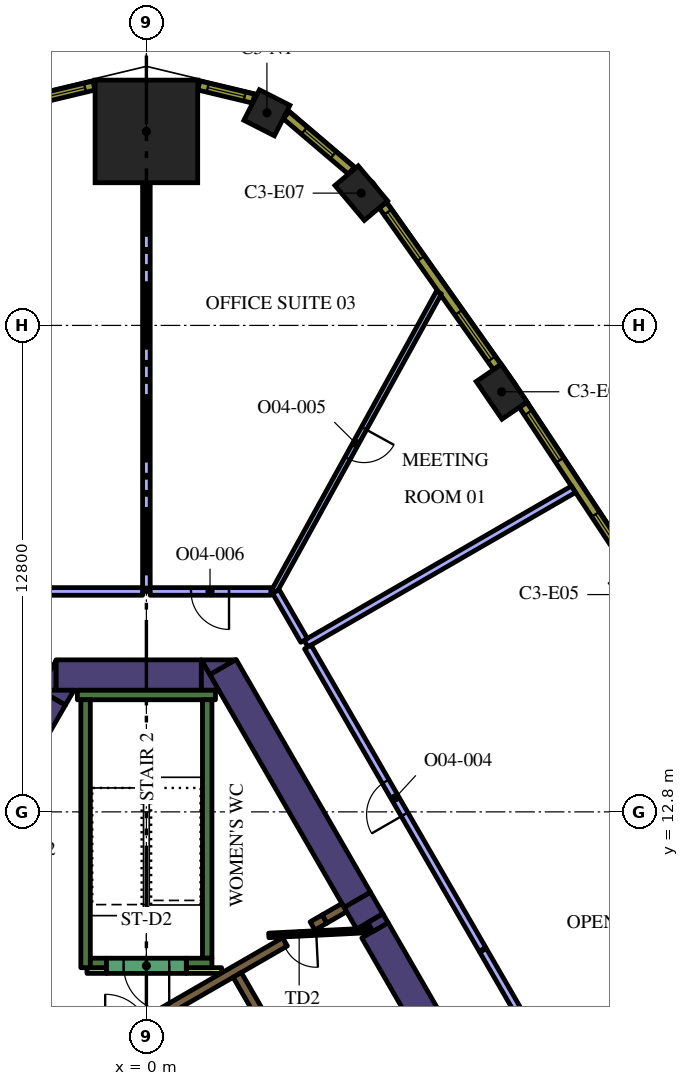
"""IFC4 building model, lengths in metres.
Left out: names, types, materials, properties, quantities, classifications, styles, units other than length and angle.
Written with IfcOpenShell. Run it as: python <this file> out.ifc"""

import sys

from ifc_helpers import new_model, si_unit, direction, frame, frame_2d, origin, origin_2d, place, context, subcontext, project, spatial, polyline, rectangle, outline, extrude, element, fill, save


model = new_model("IFC4")
c1 = context("Model", 3, precision=1e-05, world=origin(), true_north=direction((0.0, 1.0)))
c2 = subcontext(c1, "Body", "Model", "MODEL_VIEW")
j1 = project(units=[si_unit("LENGTHUNIT", "METRE"), si_unit("PLANEANGLEUNIT", "RADIAN")], contexts=[c1])
p1 = place(None, origin())
s1 = spatial("IfcSite", under=j1, at=p1, CompositionType="ELEMENT")
p2 = place(p1, origin())
s2 = spatial("IfcBuilding", under=s1, at=p2, CompositionType="ELEMENT")
p3 = place(p2, frame((0.0, 0.0, 179.4)))
s3 = spatial("IfcBuildingStorey", under=s2, at=p3, CompositionType="ELEMENT", Elevation=179.4)
p4 = place(p3, frame((0.0, 30.704, 0.0), z_axis=(0.0, 0.0, 1.0), x_axis=(0.0, 1.0, 0.0)))
e1 = element("IfcColumn", 1, at=p4, inside=s3, PredefinedType="COLUMN", context=c2, shape_type="SweptSolid", body=[
    extrude(rectangle(XDim=2.7, YDim=2.7, at=origin_2d()), origin(), (0.0, 0.0, 1.0), 4.2),
])
for number, where, z_axis, x_axis in (
    (2, (9.348, 23.854, 0.0), (0.0, 0.0, 1.0), (-0.565, 0.825, 0.0)),
    (3, (5.654, 29.081, 0.0), (0.0, 0.0, 1.0), (-0.644, 0.765, 0.0)),
):
    element("IfcColumn", number, at=place(p3, frame(where, z_axis=z_axis, x_axis=x_axis)), inside=s3, PredefinedType="COLUMN", context=c2, shape_type="SweptSolid", body=[
        extrude(rectangle(XDim=1.2, YDim=0.8, at=origin_2d()), origin(), (0.0, 0.0, 1.0), 4.2),
    ])
p5 = place(p3, frame((3.171, 31.195, 0.0), z_axis=(0.0, 0.0, 1.0), x_axis=(-0.891486197647, 0.453047855535, 0.0)))
e4 = element("IfcColumn", 4, at=p5, inside=s3, PredefinedType="COLUMN", context=c2, shape_type="SweptSolid", body=[
    extrude(rectangle(XDim=0.9, YDim=0.9, at=origin_2d()), origin(), (0.0, 0.0, 1.0), 4.2),
])
p6 = place(p3, frame((5.878, 9.918, 0.0), z_axis=(0.0, 0.0, 1.0), x_axis=(-0.499893918903, 0.866086641072, 0.0)))
e5 = element("IfcWall", 5, at=p6, inside=s3, PredefinedType="SOLIDWALL", context=c2, shape_type="SweptSolid", body=[
    extrude(rectangle(XDim=0.657, YDim=0.8, at=frame_2d((0.329, 0.0))), origin(), (0.0, 0.0, 1.0), 4.2),
])
p7 = place(p3, frame((8.279, 5.761, 0.0), z_axis=(0.0, 0.0, 1.0), x_axis=(-0.500024261398, 0.866011396007, 0.0)))
e6 = element("IfcWall", 6, at=p7, inside=s3, PredefinedType="SOLIDWALL", context=c2, shape_type="SweptSolid", body=[
    extrude(rectangle(XDim=4.528, YDim=0.8, at=frame_2d((2.264, 0.0))), origin(), (0.0, 0.0, 1.0), 4.2),
])
p8 = place(p3, origin())
e7 = element("IfcWall", 7, at=p8, inside=s3, PredefinedType="SOLIDWALL", context=c2, shape_type="SweptSolid", body=[
    extrude(outline(polyline([(5.961, 9.654), (5.827, 9.886), (6.226, 10.116), (6.36, 9.884), (5.961, 9.654)])), origin(), (0.0, 0.0, 1.0), 4.2),
])
p9 = place(p3, frame((5.549, 10.489, 0.0), z_axis=(0.0, 0.0, 1.0), x_axis=(-0.50001746176, 0.866015321998, 0.0)))
e8 = element("IfcWall", 8, at=p9, inside=s3, PredefinedType="SOLIDWALL", context=c2, shape_type="SweptSolid", body=[
    extrude(rectangle(XDim=7.068, YDim=0.8, at=frame_2d((3.534, 0.0))), origin(), (0.0, 0.0, 1.0), 4.2),
])
e9 = element("IfcWall", 9, at=p8, inside=s3, PredefinedType="SOLIDWALL", context=c2, shape_type="SweptSolid", body=[
    extrude(outline(polyline([(1.443, 16.8), (2.339, 16.8), (1.667, 16.412), (1.443, 16.8)])), origin(), (0.0, 0.0, 1.0), 4.2),
])
p10 = place(p3, frame((-2.379, 16.4, 0.0), z_axis=(0.0, 0.0, 1.0), x_axis=(1.0, 0.0, 0.0)))
e10 = element("IfcWall", 10, at=p10, inside=s3, PredefinedType="SOLIDWALL", context=c2, shape_type="SweptSolid", body=[
    extrude(rectangle(XDim=3.824, YDim=0.8, at=frame_2d((1.912, 0.0))), origin(), (0.0, 0.0, 1.0), 4.2),
])
e11 = element("IfcWall", 11, at=p8, inside=s3, PredefinedType="SOLIDWALL", context=c2, shape_type="SweptSolid", body=[
    extrude(outline(polyline([(1.905, 16.0), (1.447, 16.0), (1.447, 16.793), (1.905, 16.0)])), origin(), (0.0, 0.0, 1.0), 4.2),
])
e12 = element("IfcWall", 12, at=p8, inside=s3, PredefinedType="SOLIDWALL", context=c2, shape_type="SweptSolid", body=[
    extrude(outline(polyline([(-2.829, 16.0), (-2.381, 16.776), (-2.381, 16.0), (-2.829, 16.0)])), origin(), (0.0, 0.0, 1.0), 4.2),
])
p11 = place(p3, frame((-2.477, 15.81, 0.0), z_axis=(0.0, 0.0, 1.0), x_axis=(-0.499969377405, -0.866043083026, 0.0)))
e13 = element("IfcWall", 13, at=p11, inside=s3, PredefinedType="SOLIDWALL", context=c2, shape_type="SweptSolid", body=[
    extrude(rectangle(XDim=2.824, YDim=0.8, at=frame_2d((1.412, 0.0))), origin(), (0.0, 0.0, 1.0), 4.2),
])
e14 = element("IfcWall", 14, at=p8, inside=s3, PredefinedType="SOLIDWALL", context=c2, shape_type="SweptSolid", body=[
    extrude(outline(polyline([(-1.905, 16.0), (-2.129, 15.612), (-2.801, 16.0), (-1.905, 16.0)])), origin(), (0.0, 0.0, 1.0), 4.2),
])
p12 = place(p3, frame((-1.817, 15.875, 0.0), z_axis=(0.0, 0.0, 1.0), x_axis=(1.0, 0.0, 0.0)))
e15 = element("IfcWall", 15, at=p12, inside=s3, PredefinedType="SOLIDWALL", context=c2, shape_type="SweptSolid", body=[
    extrude(rectangle(XDim=3.634, YDim=0.25, at=frame_2d((1.817, 0.0))), origin(), (0.0, 0.0, 1.0), 4.2),
])
p13 = place(p3, frame((1.6, 8.95, 0.0), z_axis=(0.0, 0.0, 1.0), x_axis=(0.0, 1.0, 0.0)))
e16 = element("IfcWall", 16, at=p13, inside=s3, PredefinedType="SOLIDWALL", context=c2, shape_type="SweptSolid", body=[
    extrude(rectangle(XDim=6.8, YDim=0.25, at=frame_2d((3.4, 0.0))), origin(), (0.0, 0.0, 1.0), 4.2),
])
p14 = place(p3, frame((1.05, 8.825, 0.0), z_axis=(0.0, 0.0, 1.0), x_axis=(1.0, 0.0, 0.0)))
e17 = element("IfcWall", 17, at=p14, inside=s3, PredefinedType="SOLIDWALL", context=c2, shape_type="SweptSolid", body=[
    extrude(rectangle(XDim=0.675, YDim=0.25, at=frame_2d((0.337, 0.0))), origin(), (0.0, 0.0, 1.0), 4.2),
])
p15 = place(p3, frame((-1.6, 8.7, 0.0), z_axis=(0.0, 0.0, 1.0), x_axis=(0.0, 1.0, 0.0)))
e18 = element("IfcWall", 18, at=p15, inside=s3, PredefinedType="SOLIDWALL", context=c2, shape_type="SweptSolid", body=[
    extrude(rectangle(XDim=7.05, YDim=0.25, at=frame_2d((3.525, 0.0))), origin(), (0.0, 0.0, 1.0), 4.2),
])
p16 = place(p3, frame((-1.475, 8.825, 0.0), z_axis=(0.0, 0.0, 1.0), x_axis=(1.0, 0.0, 0.0)))
e19 = element("IfcWall", 19, at=p16, inside=s3, PredefinedType="SOLIDWALL", context=c2, shape_type="SweptSolid", body=[
    extrude(rectangle(XDim=0.425, YDim=0.25, at=frame_2d((0.212, 0.0))), origin(), (0.0, 0.0, 1.0), 4.2),
])
p17 = place(p3, frame((3.647, 9.38, 0.0), z_axis=(0.0, 0.0, 1.0), x_axis=(-0.866025015791, -0.500000672024, 0.0)))
e20 = element("IfcWall", 20, at=p17, inside=s3, PredefinedType="SOLIDWALL", context=c2, shape_type="SweptSolid", body=[
    extrude(rectangle(XDim=3.849, YDim=0.25, at=frame_2d((1.924, 0.0))), origin(), (0.0, 0.0, 1.0), 4.2),
])
p18 = place(p3, frame((4.688, 9.981, 0.0), z_axis=(0.0, 0.0, 1.0), x_axis=(-0.865974312977, -0.500088481434, 0.0)))
e21 = element("IfcWall", 21, at=p18, inside=s3, PredefinedType="SOLIDWALL", context=c2, shape_type="SweptSolid", body=[
    extrude(rectangle(XDim=0.366, YDim=0.25, at=frame_2d((0.183, 0.0))), origin(), (0.0, 0.0, 1.0), 4.2),
])
p19 = place(p3, frame((4.689, 9.982, 0.0), z_axis=(0.0, 0.0, 1.0), x_axis=(0.865947592822, 0.500134748329, 0.0)))
e22 = element("IfcWall", 22, at=p19, inside=s3, PredefinedType="SOLIDWALL", context=c2, shape_type="SweptSolid", body=[
    extrude(rectangle(XDim=0.598, YDim=0.25, at=frame_2d((0.299, 0.0))), origin(), (0.0, 0.0, 1.0), 4.2),
])
p20 = place(p3, frame((1.05, 8.625, 0.0), z_axis=(0.0, 0.0, 1.0), x_axis=(1.0, 0.0, 0.0)))
e23 = element("IfcWall", 23, at=p20, inside=s3, PredefinedType="PARTITIONING", context=c2, shape_type="SweptSolid", body=[
    extrude(rectangle(XDim=0.929, YDim=0.15, at=frame_2d((0.464, 0.0))), origin(), (0.0, 0.0, 1.0), 3.15),
])
p21 = place(p3, frame((-1.564, 8.625, 0.0), z_axis=(0.0, 0.0, 1.0), x_axis=(1.0, 0.0, 0.0)))
e24 = element("IfcWall", 24, at=p21, inside=s3, PredefinedType="PARTITIONING", context=c2, shape_type="SweptSolid", body=[
    extrude(rectangle(XDim=0.514, YDim=0.15, at=frame_2d((0.257, 0.0))), origin(), (0.0, 0.0, 1.0), 3.15),
])
p22 = place(p3, frame((8.565, -2.185, 0.0), z_axis=(0.0, 0.0, 1.0), x_axis=(-0.499997954832, 0.866026584559, 0.0)))
e25 = element("IfcWall", 25, at=p22, inside=s3, PredefinedType="SOLIDWALL", context=c2, shape_type="SweptSolid", body=[
    extrude(rectangle(XDim=12.35, YDim=0.25, at=frame_2d((6.175, 0.0))), origin(), (0.0, 0.0, 1.0), 4.2),
])
p23 = place(p22, frame((0.585, 0.0, 0.0)))
e26 = element("IfcOpeningElement", 26, at=p23, cuts=e25, PredefinedType="OPENING", context=c2, shape_type="SweptSolid", body=[
    extrude(rectangle(XDim=1.1, YDim=2.1, at=frame_2d((0.55, 1.05))), frame((0.0, 0.135, 0.0), z_axis=(0.0, -1.0, 0.0), x_axis=(1.0, 0.0, 0.0)), (0.0, 0.0, 1.0), 0.27),
])
p24 = place(p3, frame((1.05, 8.75, 0.0), z_axis=(0.0, 0.0, 1.0), x_axis=(-1.0, 0.0, 0.0)))
e27 = element("IfcWall", 27, at=p24, inside=s3, PredefinedType="SOLIDWALL", context=c2, shape_type="SweptSolid", body=[
    extrude(rectangle(XDim=2.1, YDim=0.4, at=frame_2d((1.05, 0.0))), origin(), (0.0, 0.0, 1.0), 4.2),
])
p25 = place(p24, frame((0.45, 0.0, 0.0)))
e28 = element("IfcOpeningElement", 28, at=p25, cuts=e27, PredefinedType="OPENING", context=c2, shape_type="SweptSolid", body=[
    extrude(rectangle(XDim=1.2, YDim=2.1, at=frame_2d((0.6, 1.05))), frame((0.0, 0.21, 0.0), z_axis=(0.0, -1.0, 0.0), x_axis=(1.0, 0.0, 0.0)), (0.0, 0.0, 1.0), 0.42),
])
p26 = place(p3, frame((5.917, 9.684, 0.0), z_axis=(0.0, 0.0, 1.0), x_axis=(-0.998758194515, -0.049820366212, 0.0)))
e29 = element("IfcWall", 29, at=p26, inside=s3, PredefinedType="PARTITIONING", context=c2, shape_type="SweptSolid", body=[
    extrude(rectangle(XDim=2.7, YDim=0.12, at=frame_2d((1.35, 0.0))), origin(), (0.0, 0.0, 1.0), 3.15),
])
p27 = place(p26, frame((1.45, 0.0, 0.0)))
e30 = element("IfcOpeningElement", 30, at=p27, cuts=e29, PredefinedType="OPENING", context=c2, shape_type="SweptSolid", body=[
    extrude(rectangle(XDim=0.9, YDim=2.1, at=frame_2d((0.45, 1.05))), frame((0.0, 0.07, 0.0), z_axis=(0.0, -1.0, 0.0), x_axis=(1.0, 0.0, 0.0)), (0.0, 0.0, 1.0), 0.14),
])
p28 = place(p3, frame((4.2, 17.226, 0.0), z_axis=(0.0, 0.0, 1.0), x_axis=(0.866021486214, 0.500006785369, 0.0)))
e31 = element("IfcWall", 31, at=p28, inside=s3, PredefinedType="PARTITIONING", context=c2, shape_type="SweptSolid", body=[
    extrude(rectangle(XDim=8.126, YDim=0.2, at=frame_2d((4.063, 0.0))), origin(), (0.0, 0.0, 1.0), 3.15),
])
p29 = place(p3, frame((12.359, 3.094, 0.0), z_axis=(0.0, 0.0, 1.0), x_axis=(-0.500010275428, 0.866019471182, 0.0)))
e32 = element("IfcWall", 32, at=p29, inside=s3, PredefinedType="PARTITIONING", context=c2, shape_type="SweptSolid", body=[
    extrude(rectangle(XDim=7.0, YDim=0.2, at=frame_2d((3.5, 0.0))), origin(), (0.0, 0.0, 1.0), 3.15),
])
p30 = place(p3, frame((8.844, 9.182, 0.0), z_axis=(0.0, 0.0, 1.0), x_axis=(-0.50000000053, 0.866025403479, 0.0)))
e33 = element("IfcWall", 33, at=p30, inside=s3, PredefinedType="PARTITIONING", context=c2, shape_type="SweptSolid", body=[
    extrude(rectangle(XDim=9.188, YDim=0.2, at=frame_2d((4.594, 0.0))), origin(), (0.0, 0.0, 1.0), 3.15),
])
p31 = place(p30, frame((4.1, 0.0, 0.0)))
e34 = element("IfcOpeningElement", 34, at=p31, cuts=e33, PredefinedType="OPENING", context=c2, shape_type="SweptSolid", body=[
    extrude(rectangle(XDim=1.0, YDim=2.1, at=frame_2d((0.5, 1.05))), frame((0.0, 0.11, 0.0), z_axis=(0.0, -1.0, 0.0), x_axis=(1.0, 0.0, 0.0)), (0.0, 0.0, 1.0), 0.22),
])
p32 = place(p3, frame((7.698, 26.465, 0.0), z_axis=(0.0, 0.0, 1.0), x_axis=(-0.482998301798, -0.875621288263, 0.0)))
e35 = element("IfcWall", 35, at=p32, inside=s3, PredefinedType="PARTITIONING", context=c2, shape_type="SweptSolid", body=[
    extrude(rectangle(XDim=8.982, YDim=0.15, at=frame_2d((4.491, 0.0))), origin(), (0.0, 0.0, 1.0), 3.15),
])
p33 = place(p32, frame((4.083, 0.0, 0.0)))
e36 = element("IfcOpeningElement", 36, at=p33, cuts=e35, PredefinedType="OPENING", context=c2, shape_type="SweptSolid", body=[
    extrude(rectangle(XDim=0.9, YDim=2.1, at=frame_2d((0.45, 1.05))), frame((0.0, 0.085, 0.0), z_axis=(0.0, -1.0, 0.0), x_axis=(1.0, 0.0, 0.0)), (0.0, 0.0, 1.0), 0.17),
])
p34 = place(p3, frame((4.15, 17.312, 0.0), z_axis=(0.0, 0.0, 1.0), x_axis=(-0.499935638681, 0.86606255962, 0.0)))
e37 = element("IfcWall", 37, at=p34, inside=s3, PredefinedType="PARTITIONING", context=c2, shape_type="SweptSolid", body=[
    extrude(rectangle(XDim=1.487, YDim=0.2, at=frame_2d((0.744, 0.0))), origin(), (0.0, 0.0, 1.0), 3.15),
])
p35 = place(p3, frame((0.0, 18.6, 0.0), z_axis=(0.0, 0.0, 1.0), x_axis=(0.0, 1.0, 0.0)))
e38 = element("IfcWall", 38, at=p35, inside=s3, PredefinedType="PARTITIONING", context=c2, shape_type="SweptSolid", body=[
    extrude(rectangle(XDim=10.754, YDim=0.2, at=frame_2d((5.377, 0.0))), origin(), (0.0, 0.0, 1.0), 3.15),
])
p36 = place(p3, frame((3.274, 18.6, 0.0), z_axis=(0.0, 0.0, 1.0), x_axis=(-1.0, 0.0, 0.0)))
e39 = element("IfcWall", 39, at=p36, inside=s3, PredefinedType="PARTITIONING", context=c2, shape_type="SweptSolid", body=[
    extrude(rectangle(XDim=3.174, YDim=0.2, at=frame_2d((1.587, 0.0))), origin(), (0.0, 0.0, 1.0), 3.15),
])
p37 = place(p36, frame((1.1, 0.0, 0.0)))
e40 = element("IfcOpeningElement", 40, at=p37, cuts=e39, PredefinedType="OPENING", context=c2, shape_type="SweptSolid", body=[
    extrude(rectangle(XDim=1.0, YDim=2.1, at=frame_2d((0.5, 1.05))), frame((0.0, 0.11, 0.0), z_axis=(0.0, -1.0, 0.0), x_axis=(1.0, 0.0, 0.0)), (0.0, 0.0, 1.0), 0.22),
])
p38 = place(p3, frame((-0.1, 18.6, 0.0), z_axis=(0.0, 0.0, 1.0), x_axis=(-1.0, 0.0, 0.0)))
e41 = element("IfcWall", 41, at=p38, inside=s3, PredefinedType="PARTITIONING", context=c2, shape_type="SweptSolid", body=[
    extrude(rectangle(XDim=3.306, YDim=0.2, at=frame_2d((1.653, 0.0))), origin(), (0.0, 0.0, 1.0), 3.15),
])
p39 = place(p3, frame((12.783, 19.171, 0.0), z_axis=(0.0, 0.0, 1.0), x_axis=(-0.551892811511, 0.833915058386, 0.0)))
e42 = element("IfcWall", 42, at=p39, inside=s3, PredefinedType="SOLIDWALL", context=c2, shape_type="SweptSolid", body=[
    extrude(rectangle(XDim=5.204, YDim=0.24, at=frame_2d((2.602, 0.0))), origin(), (0.0, 0.0, 1.0), 3.95),
])
p40 = place(p39, frame((0.248, 0.0, 0.9)))
e43 = element("IfcOpeningElement", 43, at=p40, cuts=e42, PredefinedType="OPENING", context=c2, shape_type="SweptSolid", body=[
    extrude(rectangle(XDim=1.5, YDim=2.55, at=frame_2d((0.75, 1.275))), frame((0.0, 0.13, 0.0), z_axis=(0.0, -1.0, 0.0), x_axis=(1.0, 0.0, 0.0)), (0.0, 0.0, 1.0), 0.26),
])
p41 = place(p39, frame((3.455, 0.0, 0.9)))
e44 = element("IfcOpeningElement", 44, at=p41, cuts=e42, PredefinedType="OPENING", context=c2, shape_type="SweptSolid", body=[
    extrude(rectangle(XDim=1.5, YDim=2.55, at=frame_2d((0.75, 1.275))), frame((0.0, 0.13, 0.0), z_axis=(0.0, -1.0, 0.0), x_axis=(1.0, 0.0, 0.0)), (0.0, 0.0, 1.0), 0.26),
])
p42 = place(p3, frame((9.231, 24.504, 0.0), z_axis=(0.0, 0.0, 1.0), x_axis=(-0.577115207679, 0.816662743772, 0.0)))
e45 = element("IfcWall", 45, at=p42, inside=s3, PredefinedType="SOLIDWALL", context=c2, shape_type="SweptSolid", body=[
    extrude(rectangle(XDim=5.213, YDim=0.24, at=frame_2d((2.606, 0.0))), origin(), (0.0, 0.0, 1.0), 3.95),
])
p43 = place(p42, frame((0.261, 0.0, 0.9)))
e46 = element("IfcOpeningElement", 46, at=p43, cuts=e45, PredefinedType="OPENING", context=c2, shape_type="SweptSolid", body=[
    extrude(rectangle(XDim=1.5, YDim=2.55, at=frame_2d((0.75, 1.275))), frame((0.0, 0.13, 0.0), z_axis=(0.0, -1.0, 0.0), x_axis=(1.0, 0.0, 0.0)), (0.0, 0.0, 1.0), 0.26),
])
p44 = place(p42, frame((3.492, 0.0, 0.9)))
e47 = element("IfcOpeningElement", 47, at=p44, cuts=e45, PredefinedType="OPENING", context=c2, shape_type="SweptSolid", body=[
    extrude(rectangle(XDim=1.5, YDim=2.55, at=frame_2d((0.75, 1.275))), frame((0.0, 0.13, 0.0), z_axis=(0.0, -1.0, 0.0), x_axis=(1.0, 0.0, 0.0)), (0.0, 0.0, 1.0), 0.26),
])
p45 = place(p3, frame((5.392, 29.672, 0.0), z_axis=(0.0, 0.0, 1.0), x_axis=(-0.761419744247, 0.648259186645, 0.0)))
e48 = element("IfcWall", 48, at=p45, inside=s3, PredefinedType="SOLIDWALL", context=c2, shape_type="SweptSolid", body=[
    extrude(rectangle(XDim=2.25, YDim=0.24, at=frame_2d((1.125, 0.0))), origin(), (0.0, 0.0, 1.0), 3.95),
])
p46 = place(p45, frame((0.625, 0.0, 0.9)))
e49 = element("IfcOpeningElement", 49, at=p46, cuts=e48, PredefinedType="OPENING", context=c2, shape_type="SweptSolid", body=[
    extrude(rectangle(XDim=1.0, YDim=2.55, at=frame_2d((0.5, 1.275))), frame((0.0, 0.13, 0.0), z_axis=(0.0, -1.0, 0.0), x_axis=(1.0, 0.0, 0.0)), (0.0, 0.0, 1.0), 0.26),
])
p47 = place(p3, frame((2.821, 31.566, 0.0), z_axis=(0.0, 0.0, 1.0), x_axis=(-0.972479955788, 0.232986556673, 0.0)))
e50 = element("IfcWall", 50, at=p47, inside=s3, PredefinedType="SOLIDWALL", context=c2, shape_type="SweptSolid", body=[
    extrude(rectangle(XDim=1.482, YDim=0.24, at=frame_2d((0.741, 0.0))), origin(), (0.0, 0.0, 1.0), 3.95),
])
p48 = place(p47, frame((0.241, 0.0, 0.9)))
e51 = element("IfcOpeningElement", 51, at=p48, cuts=e50, PredefinedType="OPENING", context=c2, shape_type="SweptSolid", body=[
    extrude(rectangle(XDim=1.0, YDim=2.55, at=frame_2d((0.5, 1.275))), frame((0.0, 0.13, 0.0), z_axis=(0.0, -1.0, 0.0), x_axis=(1.0, 0.0, 0.0)), (0.0, 0.0, 1.0), 0.26),
])
p49 = place(p3, frame((-1.38, 31.912, 0.0), z_axis=(0.0, 0.0, 1.0), x_axis=(-0.972479955788, -0.232986556673, 0.0)))
e52 = element("IfcWall", 52, at=p49, inside=s3, PredefinedType="SOLIDWALL", context=c2, shape_type="SweptSolid", body=[
    extrude(rectangle(XDim=1.482, YDim=0.24, at=frame_2d((0.741, 0.0))), origin(), (0.0, 0.0, 1.0), 3.95),
])
p50 = place(p49, frame((0.241, 0.0, 0.9)))
e53 = element("IfcOpeningElement", 53, at=p50, cuts=e52, PredefinedType="OPENING", context=c2, shape_type="SweptSolid", body=[
    extrude(rectangle(XDim=1.0, YDim=2.55, at=frame_2d((0.5, 1.275))), frame((0.0, 0.13, 0.0), z_axis=(0.0, -1.0, 0.0), x_axis=(1.0, 0.0, 0.0)), (0.0, 0.0, 1.0), 0.26),
])
p51 = place(p25, origin())
e54 = element("IfcDoor", 54, at=p51, inside=s3, OperationType="SINGLE_SWING_LEFT", PredefinedType="DOOR", context=c2, shape_type="SweptSolid", body=[
    extrude(rectangle(XDim=1.2, YDim=2.1, at=frame_2d((0.6, 1.05))), frame((0.0, 0.025, 0.0), z_axis=(0.0, -1.0, 0.0), x_axis=(1.0, 0.0, 0.0)), (0.0, 0.0, 1.0), 0.05),
])
fill(e28, e54)
p52 = place(p27, origin())
e55 = element("IfcDoor", 55, at=p52, inside=s3, OperationType="SINGLE_SWING_LEFT", PredefinedType="DOOR", context=c2, shape_type="SweptSolid", body=[
    extrude(rectangle(XDim=0.9, YDim=2.1, at=frame_2d((0.45, 1.05))), frame((0.0, 0.025, 0.0), z_axis=(0.0, -1.0, 0.0), x_axis=(1.0, 0.0, 0.0)), (0.0, 0.0, 1.0), 0.05),
])
fill(e30, e55)
p53 = place(p31, origin())
e56 = element("IfcDoor", 56, at=p53, inside=s3, OperationType="SINGLE_SWING_RIGHT", PredefinedType="DOOR", context=c2, shape_type="SweptSolid", body=[
    extrude(rectangle(XDim=1.0, YDim=2.1, at=frame_2d((0.5, 1.05))), frame((0.0, 0.025, 0.0), z_axis=(0.0, -1.0, 0.0), x_axis=(1.0, 0.0, 0.0)), (0.0, 0.0, 1.0), 0.05),
])
fill(e34, e56)
p54 = place(p33, origin())
e57 = element("IfcDoor", 57, at=p54, inside=s3, OperationType="SINGLE_SWING_RIGHT", PredefinedType="DOOR", context=c2, shape_type="SweptSolid", body=[
    extrude(rectangle(XDim=0.9, YDim=2.1, at=frame_2d((0.45, 1.05))), frame((0.0, 0.025, 0.0), z_axis=(0.0, -1.0, 0.0), x_axis=(1.0, 0.0, 0.0)), (0.0, 0.0, 1.0), 0.05),
])
fill(e36, e57)
p55 = place(p37, origin())
e58 = element("IfcDoor", 58, at=p55, inside=s3, OperationType="SINGLE_SWING_RIGHT", PredefinedType="DOOR", context=c2, shape_type="SweptSolid", body=[
    extrude(rectangle(XDim=1.0, YDim=2.1, at=frame_2d((0.5, 1.05))), frame((0.0, 0.025, 0.0), z_axis=(0.0, -1.0, 0.0), x_axis=(1.0, 0.0, 0.0)), (0.0, 0.0, 1.0), 0.05),
])
fill(e40, e58)
p56 = place(p40, origin())
e59 = element("IfcWindow", 59, at=p56, inside=s3, PartitioningType="SINGLE_PANEL", PredefinedType="WINDOW", context=c2, shape_type="SweptSolid", body=[
    extrude(rectangle(XDim=1.5, YDim=2.55, at=frame_2d((0.75, 1.275))), frame((0.0, 0.04, 0.0), z_axis=(0.0, -1.0, 0.0), x_axis=(1.0, 0.0, 0.0)), (0.0, 0.0, 1.0), 0.06),
])
fill(e43, e59)
p57 = place(p41, origin())
e60 = element("IfcWindow", 60, at=p57, inside=s3, PartitioningType="SINGLE_PANEL", PredefinedType="WINDOW", context=c2, shape_type="SweptSolid", body=[
    extrude(rectangle(XDim=1.5, YDim=2.55, at=frame_2d((0.75, 1.275))), frame((0.0, 0.04, 0.0), z_axis=(0.0, -1.0, 0.0), x_axis=(1.0, 0.0, 0.0)), (0.0, 0.0, 1.0), 0.06),
])
fill(e44, e60)
p58 = place(p43, origin())
e61 = element("IfcWindow", 61, at=p58, inside=s3, PartitioningType="SINGLE_PANEL", PredefinedType="WINDOW", context=c2, shape_type="SweptSolid", body=[
    extrude(rectangle(XDim=1.5, YDim=2.55, at=frame_2d((0.75, 1.275))), frame((0.0, 0.04, 0.0), z_axis=(0.0, -1.0, 0.0), x_axis=(1.0, 0.0, 0.0)), (0.0, 0.0, 1.0), 0.06),
])
fill(e46, e61)
p59 = place(p44, origin())
e62 = element("IfcWindow", 62, at=p59, inside=s3, PartitioningType="SINGLE_PANEL", PredefinedType="WINDOW", context=c2, shape_type="SweptSolid", body=[
    extrude(rectangle(XDim=1.5, YDim=2.55, at=frame_2d((0.75, 1.275))), frame((0.0, 0.04, 0.0), z_axis=(0.0, -1.0, 0.0), x_axis=(1.0, 0.0, 0.0)), (0.0, 0.0, 1.0), 0.06),
])
fill(e47, e62)
p60 = place(p46, origin())
e63 = element("IfcWindow", 63, at=p60, inside=s3, PartitioningType="SINGLE_PANEL", PredefinedType="WINDOW", context=c2, shape_type="SweptSolid", body=[
    extrude(rectangle(XDim=1.0, YDim=2.55, at=frame_2d((0.5, 1.275))), frame((0.0, 0.04, 0.0), z_axis=(0.0, -1.0, 0.0), x_axis=(1.0, 0.0, 0.0)), (0.0, 0.0, 1.0), 0.06),
])
fill(e49, e63)
p61 = place(p48, origin())
e64 = element("IfcWindow", 64, at=p61, inside=s3, PartitioningType="SINGLE_PANEL", PredefinedType="WINDOW", context=c2, shape_type="SweptSolid", body=[
    extrude(rectangle(XDim=1.0, YDim=2.55, at=frame_2d((0.5, 1.275))), frame((0.0, 0.04, 0.0), z_axis=(0.0, -1.0, 0.0), x_axis=(1.0, 0.0, 0.0)), (0.0, 0.0, 1.0), 0.06),
])
fill(e51, e64)
p62 = place(p50, origin())
e65 = element("IfcWindow", 65, at=p62, inside=s3, PartitioningType="SINGLE_PANEL", PredefinedType="WINDOW", context=c2, shape_type="SweptSolid", body=[
    extrude(rectangle(XDim=1.0, YDim=2.55, at=frame_2d((0.5, 1.275))), frame((0.0, 0.04, 0.0), z_axis=(0.0, -1.0, 0.0), x_axis=(1.0, 0.0, 0.0)), (0.0, 0.0, 1.0), 0.06),
])
fill(e53, e65)
save(model, sys.argv[1])
